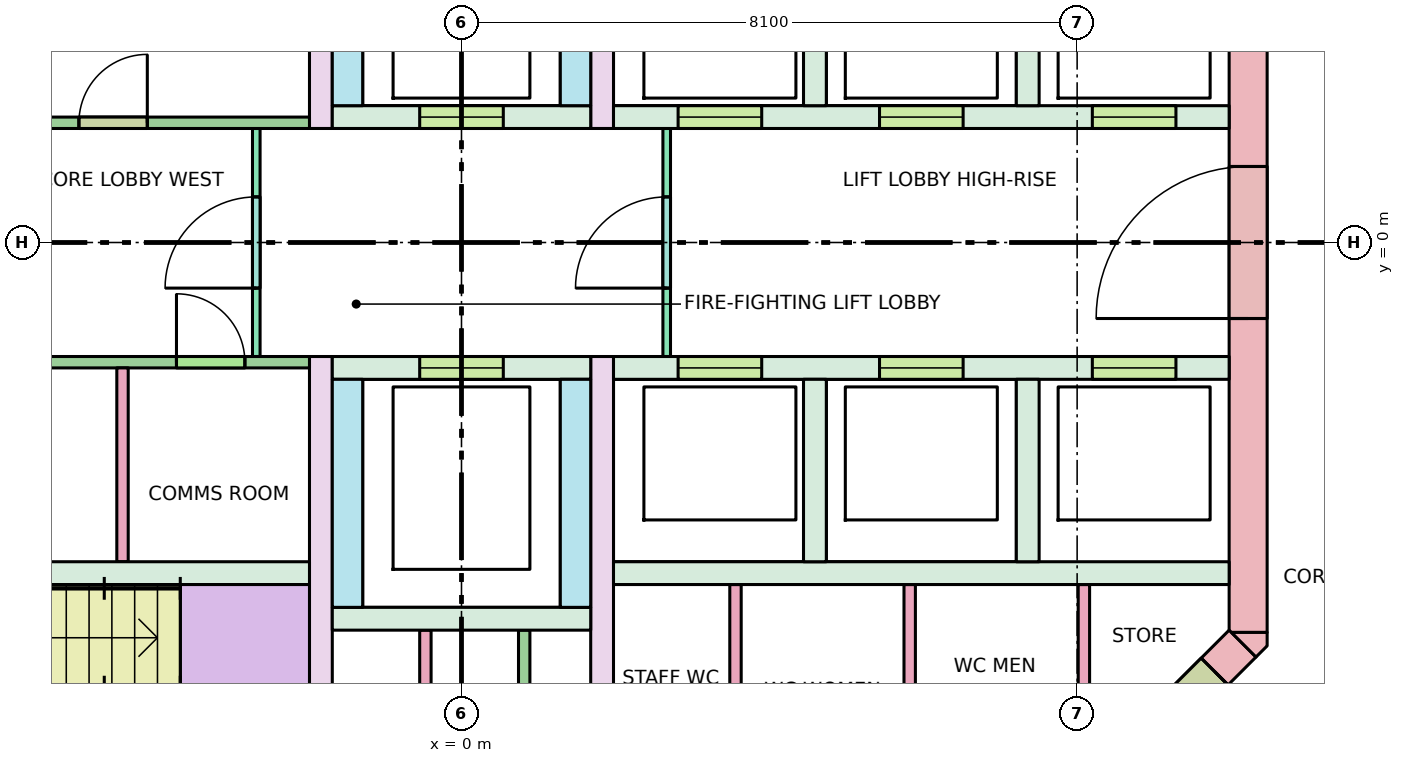
"""IFC4 building model, lengths in metres.
Left out: names, types, materials, properties, quantities, classifications, styles, units other than length and angle.
Written with IfcOpenShell. Run it as: python <this file> out.ifc"""

import sys

from ifc_helpers import new_model, si_unit, direction, frame, frame_2d, origin, place, context, subcontext, project, spatial, polyline, rectangle, outline, extrude, element, fill, save


model = new_model("IFC4")
c1 = context("Model", 3, precision=1e-05, world=origin(), true_north=direction((0.0, 1.0)))
c2 = subcontext(c1, "Body", "Model", "MODEL_VIEW")
j1 = project(units=[si_unit("LENGTHUNIT", "METRE"), si_unit("PLANEANGLEUNIT", "RADIAN")], contexts=[c1])
p1 = place(None, origin())
s1 = spatial("IfcSite", under=j1, at=p1, CompositionType="ELEMENT")
p2 = place(p1, origin())
s2 = spatial("IfcBuilding", under=s1, at=p2, CompositionType="ELEMENT")
p3 = place(p2, frame((0.0, 0.0, 264.9)))
s3 = spatial("IfcBuildingStorey", under=s2, at=p3, CompositionType="ELEMENT", Elevation=264.9)
p4 = place(p3, frame((10.35, -5.13, -0.28), z_axis=(0.0, 0.0, 1.0), x_axis=(0.0, 1.0, 0.0)))
e1 = element("IfcWall", 1, at=p4, inside=s3, PredefinedType="SHEAR", context=c2, shape_type="SweptSolid", body=[
    extrude(rectangle(XDim=10.26, YDim=0.5, at=frame_2d((5.13, 0.0))), origin(), (0.0, 0.0, 1.0), 3.7),
])
p5 = place(p4, frame((4.13, 0.0, 0.28)))
e2 = element("IfcOpeningElement", 2, at=p5, cuts=e1, PredefinedType="OPENING", context=c2, shape_type="SweptSolid", body=[
    extrude(rectangle(XDim=2.0, YDim=2.1, at=frame_2d((1.0, 1.05))), frame((0.0, 0.26, 0.0), z_axis=(0.0, -1.0, 0.0), x_axis=(1.0, 0.0, 0.0)), (0.0, 0.0, 1.0), 0.52),
])
p6 = place(p3, frame((10.277, -5.277, -0.28), z_axis=(0.0, 0.0, 1.0), x_axis=(-0.707106781187, -0.707106781187, 0.0)))
e3 = element("IfcWall", 3, at=p6, inside=s3, PredefinedType="SHEAR", context=c2, shape_type="SweptSolid", body=[
    extrude(rectangle(XDim=4.243, YDim=0.5, at=frame_2d((2.121, 0.0))), origin(), (0.0, 0.0, 1.0), 3.7),
])
p7 = place(p6, frame((2.823, 0.0, 0.28)))
e4 = element("IfcOpeningElement", 4, at=p7, cuts=e3, PredefinedType="OPENING", context=c2, shape_type="SweptSolid", body=[
    extrude(rectangle(XDim=0.9, YDim=2.1, at=frame_2d((0.45, 1.05))), frame((0.0, 0.26, 0.0), z_axis=(0.0, -1.0, 0.0), x_axis=(1.0, 0.0, 0.0)), (0.0, 0.0, 1.0), 0.52),
])
p8 = place(p6, frame((0.52, 0.0, 0.28)))
e5 = element("IfcOpeningElement", 5, at=p8, cuts=e3, PredefinedType="OPENING", context=c2, shape_type="SweptSolid", body=[
    extrude(rectangle(XDim=0.9, YDim=2.1, at=frame_2d((0.45, 1.05))), frame((0.0, 0.26, 0.0), z_axis=(0.0, -1.0, 0.0), x_axis=(1.0, 0.0, 0.0)), (0.0, 0.0, 1.0), 0.52),
])
p9 = place(p3, frame((0.0, 0.0, -0.28)))
e6 = element("IfcWall", 6, at=p9, inside=s3, PredefinedType="SHEAR", context=c2, shape_type="SweptSolid", body=[
    extrude(outline(polyline([(10.6, -5.307), (10.454, -5.454), (10.13, -5.13), (10.6, -5.13), (10.6, -5.307)])), origin(), (0.0, 0.0, 1.0), 3.7),
])
for number, where, z_axis, x_axis in (
    (7, (-10.1, -4.35, 0.0), (0.0, 0.0, 1.0), (1.0, 0.0, 0.0)),
    (8, (2.0, -4.35, 0.0), (0.0, 0.0, 1.0), (1.0, 0.0, 0.0)),
):
    element("IfcWall", number, at=place(p3, frame(where, z_axis=z_axis, x_axis=x_axis)), inside=s3, PredefinedType="SOLIDWALL", context=c2, shape_type="SweptSolid", body=[
        extrude(rectangle(XDim=8.1, YDim=0.3, at=frame_2d((4.05, 0.0))), origin(), (0.0, 0.0, 1.0), 3.42),
    ])
p10 = place(p3, frame((2.0, 1.65, 0.0), z_axis=(0.0, 0.0, 1.0), x_axis=(1.0, 0.0, 0.0)))
e9 = element("IfcWall", 9, at=p10, inside=s3, PredefinedType="SOLIDWALL", context=c2, shape_type="SweptSolid", body=[
    extrude(rectangle(XDim=8.1, YDim=0.3, at=frame_2d((4.05, 0.0))), origin(), (0.0, 0.0, 1.0), 3.42),
])
p11 = place(p10, frame((0.85, 0.0, 0.0)))
e10 = element("IfcOpeningElement", 10, at=p11, cuts=e9, PredefinedType="OPENING", context=c2, shape_type="SweptSolid", body=[
    extrude(rectangle(XDim=1.1, YDim=2.1, at=frame_2d((0.55, 1.05))), frame((0.0, 0.16, 0.0), z_axis=(0.0, -1.0, 0.0), x_axis=(1.0, 0.0, 0.0)), (0.0, 0.0, 1.0), 0.32),
])
p12 = place(p10, frame((3.5, 0.0, 0.0)))
e11 = element("IfcOpeningElement", 11, at=p12, cuts=e9, PredefinedType="OPENING", context=c2, shape_type="SweptSolid", body=[
    extrude(rectangle(XDim=1.1, YDim=2.1, at=frame_2d((0.55, 1.05))), frame((0.0, 0.16, 0.0), z_axis=(0.0, -1.0, 0.0), x_axis=(1.0, 0.0, 0.0)), (0.0, 0.0, 1.0), 0.32),
])
p13 = place(p10, frame((6.3, 0.0, 0.0)))
e12 = element("IfcOpeningElement", 12, at=p13, cuts=e9, PredefinedType="OPENING", context=c2, shape_type="SweptSolid", body=[
    extrude(rectangle(XDim=1.1, YDim=2.1, at=frame_2d((0.55, 1.05))), frame((0.0, 0.16, 0.0), z_axis=(0.0, -1.0, 0.0), x_axis=(1.0, 0.0, 0.0)), (0.0, 0.0, 1.0), 0.32),
])
p14 = place(p3, frame((2.0, -1.65, 0.0), z_axis=(0.0, 0.0, 1.0), x_axis=(1.0, 0.0, 0.0)))
e13 = element("IfcWall", 13, at=p14, inside=s3, PredefinedType="SOLIDWALL", context=c2, shape_type="SweptSolid", body=[
    extrude(rectangle(XDim=8.1, YDim=0.3, at=frame_2d((4.05, 0.0))), origin(), (0.0, 0.0, 1.0), 3.42),
])
p15 = place(p14, frame((0.85, 0.0, 0.0)))
e14 = element("IfcOpeningElement", 14, at=p15, cuts=e13, PredefinedType="OPENING", context=c2, shape_type="SweptSolid", body=[
    extrude(rectangle(XDim=1.1, YDim=2.1, at=frame_2d((0.55, 1.05))), frame((0.0, 0.16, 0.0), z_axis=(0.0, -1.0, 0.0), x_axis=(1.0, 0.0, 0.0)), (0.0, 0.0, 1.0), 0.32),
])
p16 = place(p14, frame((3.5, 0.0, 0.0)))
e15 = element("IfcOpeningElement", 15, at=p16, cuts=e13, PredefinedType="OPENING", context=c2, shape_type="SweptSolid", body=[
    extrude(rectangle(XDim=1.1, YDim=2.1, at=frame_2d((0.55, 1.05))), frame((0.0, 0.16, 0.0), z_axis=(0.0, -1.0, 0.0), x_axis=(1.0, 0.0, 0.0)), (0.0, 0.0, 1.0), 0.32),
])
p17 = place(p14, frame((6.3, 0.0, 0.0)))
e16 = element("IfcOpeningElement", 16, at=p17, cuts=e13, PredefinedType="OPENING", context=c2, shape_type="SweptSolid", body=[
    extrude(rectangle(XDim=1.1, YDim=2.1, at=frame_2d((0.55, 1.05))), frame((0.0, 0.16, 0.0), z_axis=(0.0, -1.0, 0.0), x_axis=(1.0, 0.0, 0.0)), (0.0, 0.0, 1.0), 0.32),
])
for number, where, z_axis, x_axis in (
    (17, (4.65, 1.8, 0.0), (0.0, 0.0, 1.0), (0.0, 1.0, 0.0)),
    (18, (4.65, -4.2, 0.0), (0.0, 0.0, 1.0), (0.0, 1.0, 0.0)),
    (19, (7.45, 1.8, 0.0), (0.0, 0.0, 1.0), (0.0, 1.0, 0.0)),
    (20, (7.45, -4.2, 0.0), (0.0, 0.0, 1.0), (0.0, 1.0, 0.0)),
):
    element("IfcWall", number, at=place(p3, frame(where, z_axis=z_axis, x_axis=x_axis)), inside=s3, PredefinedType="SOLIDWALL", context=c2, shape_type="SweptSolid", body=[
        extrude(rectangle(XDim=2.4, YDim=0.3, at=frame_2d((1.2, 0.0))), origin(), (0.0, 0.0, 1.0), 3.42),
    ])
for number, where, z_axis, x_axis in (
    (21, (-1.85, 1.5, 0.0), (0.0, 0.0, 1.0), (0.0, 1.0, 0.0)),
    (22, (-1.85, -8.1, 0.0), (0.0, 0.0, 1.0), (0.0, 1.0, 0.0)),
    (23, (1.85, 1.5, 0.0), (0.0, 0.0, 1.0), (0.0, 1.0, 0.0)),
    (24, (1.85, -8.1, 0.0), (0.0, 0.0, 1.0), (0.0, 1.0, 0.0)),
):
    element("IfcWall", number, at=place(p3, frame(where, z_axis=z_axis, x_axis=x_axis)), inside=s3, PredefinedType="SHEAR", context=c2, shape_type="SweptSolid", body=[
        extrude(rectangle(XDim=6.6, YDim=0.3, at=frame_2d((3.3, 0.0))), origin(), (0.0, 0.0, 1.0), 3.42),
    ])
p18 = place(p3, frame((-1.7, 1.65, 0.0), z_axis=(0.0, 0.0, 1.0), x_axis=(1.0, 0.0, 0.0)))
e25 = element("IfcWall", 25, at=p18, inside=s3, PredefinedType="SOLIDWALL", context=c2, shape_type="SweptSolid", body=[
    extrude(rectangle(XDim=3.4, YDim=0.3, at=frame_2d((1.7, 0.0))), origin(), (0.0, 0.0, 1.0), 3.42),
])
p19 = place(p18, frame((1.15, 0.0, 0.0)))
e26 = element("IfcOpeningElement", 26, at=p19, cuts=e25, PredefinedType="OPENING", context=c2, shape_type="SweptSolid", body=[
    extrude(rectangle(XDim=1.1, YDim=2.1, at=frame_2d((0.55, 1.05))), frame((0.0, 0.16, 0.0), z_axis=(0.0, -1.0, 0.0), x_axis=(1.0, 0.0, 0.0)), (0.0, 0.0, 1.0), 0.32),
])
p20 = place(p3, frame((-1.7, -1.65, 0.0), z_axis=(0.0, 0.0, 1.0), x_axis=(1.0, 0.0, 0.0)))
e27 = element("IfcWall", 27, at=p20, inside=s3, PredefinedType="SOLIDWALL", context=c2, shape_type="SweptSolid", body=[
    extrude(rectangle(XDim=3.4, YDim=0.3, at=frame_2d((1.7, 0.0))), origin(), (0.0, 0.0, 1.0), 3.42),
])
p21 = place(p20, frame((1.15, 0.0, 0.0)))
e28 = element("IfcOpeningElement", 28, at=p21, cuts=e27, PredefinedType="OPENING", context=c2, shape_type="SweptSolid", body=[
    extrude(rectangle(XDim=1.1, YDim=2.1, at=frame_2d((0.55, 1.05))), frame((0.0, 0.16, 0.0), z_axis=(0.0, -1.0, 0.0), x_axis=(1.0, 0.0, 0.0)), (0.0, 0.0, 1.0), 0.32),
])
for number, where, z_axis, x_axis in (
    (29, (-1.5, 1.8, 0.0), (0.0, 0.0, 1.0), (0.0, 1.0, 0.0)),
    (30, (-1.5, -4.8, 0.0), (0.0, 0.0, 1.0), (0.0, 1.0, 0.0)),
    (31, (1.5, 1.8, 0.0), (0.0, 0.0, 1.0), (0.0, 1.0, 0.0)),
    (32, (1.5, -4.8, 0.0), (0.0, 0.0, 1.0), (0.0, 1.0, 0.0)),
):
    element("IfcWall", number, at=place(p3, frame(where, z_axis=z_axis, x_axis=x_axis)), inside=s3, PredefinedType="SOLIDWALL", context=c2, shape_type="SweptSolid", body=[
        extrude(rectangle(XDim=3.0, YDim=0.4, at=frame_2d((1.5, 0.0))), origin(), (0.0, 0.0, 1.0), 3.42),
    ])
p22 = place(p3, frame((-1.7, -4.95, 0.0), z_axis=(0.0, 0.0, 1.0), x_axis=(1.0, 0.0, 0.0)))
e33 = element("IfcWall", 33, at=p22, inside=s3, PredefinedType="SOLIDWALL", context=c2, shape_type="SweptSolid", body=[
    extrude(rectangle(XDim=3.4, YDim=0.3, at=frame_2d((1.7, 0.0))), origin(), (0.0, 0.0, 1.0), 3.42),
])
p23 = place(p3, frame((-2.7, -1.5, 0.0), z_axis=(0.0, 0.0, 1.0), x_axis=(0.0, 1.0, 0.0)))
e34 = element("IfcWall", 34, at=p23, inside=s3, PredefinedType="PARTITIONING", context=c2, shape_type="SweptSolid", body=[
    extrude(rectangle(XDim=3.0, YDim=0.1, at=frame_2d((1.5, 0.0))), origin(), (0.0, 0.0, 1.0), 3.42),
])
p24 = place(p23, frame((0.9, 0.0, 0.0)))
e35 = element("IfcOpeningElement", 35, at=p24, cuts=e34, PredefinedType="OPENING", context=c2, shape_type="SweptSolid", body=[
    extrude(rectangle(XDim=1.2, YDim=2.1, at=frame_2d((0.6, 1.05))), frame((0.0, 0.06, 0.0), z_axis=(0.0, -1.0, 0.0), x_axis=(1.0, 0.0, 0.0)), (0.0, 0.0, 1.0), 0.12),
])
p25 = place(p3, frame((2.7, -1.5, 0.0), z_axis=(0.0, 0.0, 1.0), x_axis=(0.0, 1.0, 0.0)))
e36 = element("IfcWall", 36, at=p25, inside=s3, PredefinedType="PARTITIONING", context=c2, shape_type="SweptSolid", body=[
    extrude(rectangle(XDim=3.0, YDim=0.1, at=frame_2d((1.5, 0.0))), origin(), (0.0, 0.0, 1.0), 3.42),
])
p26 = place(p25, frame((0.9, 0.0, 0.0)))
e37 = element("IfcOpeningElement", 37, at=p26, cuts=e36, PredefinedType="OPENING", context=c2, shape_type="SweptSolid", body=[
    extrude(rectangle(XDim=1.2, YDim=2.1, at=frame_2d((0.6, 1.05))), frame((0.0, 0.06, 0.0), z_axis=(0.0, -1.0, 0.0), x_axis=(1.0, 0.0, 0.0)), (0.0, 0.0, 1.0), 0.12),
])
for number, where, z_axis, x_axis in (
    (38, (0.825, -8.1, 0.0), (0.0, 0.0, 1.0), (0.0, 1.0, 0.0)),
    (39, (-0.475, -8.1, 0.0), (0.0, 0.0, 1.0), (0.0, 1.0, 0.0)),
):
    element("IfcWall", number, at=place(p3, frame(where, z_axis=z_axis, x_axis=x_axis)), inside=s3, PredefinedType="PARTITIONING", context=c2, shape_type="SweptSolid", body=[
        extrude(rectangle(XDim=3.0, YDim=0.15, at=frame_2d((1.5, 0.0))), origin(), (0.0, 0.0, 1.0), 3.42),
    ])
for number, where, z_axis, x_axis in (
    (40, (3.605, -8.1, 0.0), (0.0, 0.0, 1.0), (0.0, 1.0, 0.0)),
    (41, (5.897, -8.1, 0.0), (0.0, 0.0, 1.0), (0.0, 1.0, 0.0)),
):
    element("IfcWall", number, at=place(p3, frame(where, z_axis=z_axis, x_axis=x_axis)), inside=s3, PredefinedType="PARTITIONING", context=c2, shape_type="SweptSolid", body=[
        extrude(rectangle(XDim=3.6, YDim=0.15, at=frame_2d((1.8, 0.0))), origin(), (0.0, 0.0, 1.0), 3.42),
    ])
p27 = place(p3, frame((8.189, -6.936, 0.0), z_axis=(0.0, 0.0, 1.0), x_axis=(0.0, 1.0, 0.0)))
e42 = element("IfcWall", 42, at=p27, inside=s3, PredefinedType="PARTITIONING", context=c2, shape_type="SweptSolid", body=[
    extrude(rectangle(XDim=2.436, YDim=0.15, at=frame_2d((1.218, 0.0))), origin(), (0.0, 0.0, 1.0), 3.42),
])
p28 = place(p3, frame((-4.46, -4.2, 0.0), z_axis=(0.0, 0.0, 1.0), x_axis=(0.0, 1.0, 0.0)))
e43 = element("IfcWall", 43, at=p28, inside=s3, PredefinedType="PARTITIONING", context=c2, shape_type="SweptSolid", body=[
    extrude(rectangle(XDim=2.55, YDim=0.15, at=frame_2d((1.275, 0.0))), origin(), (0.0, 0.0, 1.0), 3.42),
])
p29 = place(p3, frame((-10.1, 1.575, 0.0), z_axis=(0.0, 0.0, 1.0), x_axis=(1.0, 0.0, 0.0)))
e44 = element("IfcWall", 44, at=p29, inside=s3, PredefinedType="PARTITIONING", context=c2, shape_type="SweptSolid", body=[
    extrude(rectangle(XDim=8.1, YDim=0.15, at=frame_2d((4.05, 0.0))), origin(), (0.0, 0.0, 1.0), 3.42),
])
p30 = place(p29, frame((0.941, 0.0, 0.0)))
e45 = element("IfcOpeningElement", 45, at=p30, cuts=e44, PredefinedType="OPENING", context=c2, shape_type="SweptSolid", body=[
    extrude(rectangle(XDim=0.9, YDim=2.1, at=frame_2d((0.45, 1.05))), frame((0.0, 0.085, 0.0), z_axis=(0.0, -1.0, 0.0), x_axis=(1.0, 0.0, 0.0)), (0.0, 0.0, 1.0), 0.17),
])
p31 = place(p29, frame((5.066, 0.0, 0.0)))
e46 = element("IfcOpeningElement", 46, at=p31, cuts=e44, PredefinedType="OPENING", context=c2, shape_type="SweptSolid", body=[
    extrude(rectangle(XDim=0.9, YDim=2.1, at=frame_2d((0.45, 1.05))), frame((0.0, 0.085, 0.0), z_axis=(0.0, -1.0, 0.0), x_axis=(1.0, 0.0, 0.0)), (0.0, 0.0, 1.0), 0.17),
])
p32 = place(p3, frame((-10.1, -1.575, 0.0), z_axis=(0.0, 0.0, 1.0), x_axis=(1.0, 0.0, 0.0)))
e47 = element("IfcWall", 47, at=p32, inside=s3, PredefinedType="PARTITIONING", context=c2, shape_type="SweptSolid", body=[
    extrude(rectangle(XDim=8.1, YDim=0.15, at=frame_2d((4.05, 0.0))), origin(), (0.0, 0.0, 1.0), 3.42),
])
p33 = place(p32, frame((2.333, 0.0, 0.0)))
e48 = element("IfcOpeningElement", 48, at=p33, cuts=e47, PredefinedType="OPENING", context=c2, shape_type="SweptSolid", body=[
    extrude(rectangle(XDim=0.9, YDim=2.1, at=frame_2d((0.45, 1.05))), frame((0.0, 0.085, 0.0), z_axis=(0.0, -1.0, 0.0), x_axis=(1.0, 0.0, 0.0)), (0.0, 0.0, 1.0), 0.17),
])
p34 = place(p32, frame((6.35, 0.0, 0.0)))
e49 = element("IfcOpeningElement", 49, at=p34, cuts=e47, PredefinedType="OPENING", context=c2, shape_type="SweptSolid", body=[
    extrude(rectangle(XDim=0.9, YDim=2.1, at=frame_2d((0.45, 1.05))), frame((0.0, 0.085, 0.0), z_axis=(0.0, -1.0, 0.0), x_axis=(1.0, 0.0, 0.0)), (0.0, 0.0, 1.0), 0.17),
])
p35 = place(p11, origin())
e50 = element("IfcDoor", 50, at=p35, inside=s3, OperationType="DOUBLE_DOOR_SLIDING", PredefinedType="DOOR", context=c2, shape_type="SweptSolid", body=[
    extrude(rectangle(XDim=1.1, YDim=2.1, at=frame_2d((0.55, 1.05))), frame((0.0, 0.025, 0.0), z_axis=(0.0, -1.0, 0.0), x_axis=(1.0, 0.0, 0.0)), (0.0, 0.0, 1.0), 0.05),
])
fill(e10, e50)
p36 = place(p12, origin())
e51 = element("IfcDoor", 51, at=p36, inside=s3, OperationType="DOUBLE_DOOR_SLIDING", PredefinedType="DOOR", context=c2, shape_type="SweptSolid", body=[
    extrude(rectangle(XDim=1.1, YDim=2.1, at=frame_2d((0.55, 1.05))), frame((0.0, 0.025, 0.0), z_axis=(0.0, -1.0, 0.0), x_axis=(1.0, 0.0, 0.0)), (0.0, 0.0, 1.0), 0.05),
])
fill(e11, e51)
p37 = place(p13, origin())
e52 = element("IfcDoor", 52, at=p37, inside=s3, OperationType="DOUBLE_DOOR_SLIDING", PredefinedType="DOOR", context=c2, shape_type="SweptSolid", body=[
    extrude(rectangle(XDim=1.1, YDim=2.1, at=frame_2d((0.55, 1.05))), frame((0.0, 0.025, 0.0), z_axis=(0.0, -1.0, 0.0), x_axis=(1.0, 0.0, 0.0)), (0.0, 0.0, 1.0), 0.05),
])
fill(e12, e52)
p38 = place(p15, origin())
e53 = element("IfcDoor", 53, at=p38, inside=s3, OperationType="DOUBLE_DOOR_SLIDING", PredefinedType="DOOR", context=c2, shape_type="SweptSolid", body=[
    extrude(rectangle(XDim=1.1, YDim=2.1, at=frame_2d((0.55, 1.05))), frame((0.0, 0.025, 0.0), z_axis=(0.0, -1.0, 0.0), x_axis=(1.0, 0.0, 0.0)), (0.0, 0.0, 1.0), 0.05),
])
fill(e14, e53)
p39 = place(p16, origin())
e54 = element("IfcDoor", 54, at=p39, inside=s3, OperationType="DOUBLE_DOOR_SLIDING", PredefinedType="DOOR", context=c2, shape_type="SweptSolid", body=[
    extrude(rectangle(XDim=1.1, YDim=2.1, at=frame_2d((0.55, 1.05))), frame((0.0, 0.025, 0.0), z_axis=(0.0, -1.0, 0.0), x_axis=(1.0, 0.0, 0.0)), (0.0, 0.0, 1.0), 0.05),
])
fill(e15, e54)
p40 = place(p17, origin())
e55 = element("IfcDoor", 55, at=p40, inside=s3, OperationType="DOUBLE_DOOR_SLIDING", PredefinedType="DOOR", context=c2, shape_type="SweptSolid", body=[
    extrude(rectangle(XDim=1.1, YDim=2.1, at=frame_2d((0.55, 1.05))), frame((0.0, 0.025, 0.0), z_axis=(0.0, -1.0, 0.0), x_axis=(1.0, 0.0, 0.0)), (0.0, 0.0, 1.0), 0.05),
])
fill(e16, e55)
p41 = place(p19, origin())
e56 = element("IfcDoor", 56, at=p41, inside=s3, OperationType="DOUBLE_DOOR_SLIDING", PredefinedType="DOOR", context=c2, shape_type="SweptSolid", body=[
    extrude(rectangle(XDim=1.1, YDim=2.1, at=frame_2d((0.55, 1.05))), frame((0.0, 0.025, 0.0), z_axis=(0.0, -1.0, 0.0), x_axis=(1.0, 0.0, 0.0)), (0.0, 0.0, 1.0), 0.05),
])
fill(e26, e56)
p42 = place(p21, origin())
e57 = element("IfcDoor", 57, at=p42, inside=s3, OperationType="DOUBLE_DOOR_SLIDING", PredefinedType="DOOR", context=c2, shape_type="SweptSolid", body=[
    extrude(rectangle(XDim=1.1, YDim=2.1, at=frame_2d((0.55, 1.05))), frame((0.0, 0.025, 0.0), z_axis=(0.0, -1.0, 0.0), x_axis=(1.0, 0.0, 0.0)), (0.0, 0.0, 1.0), 0.05),
])
fill(e28, e57)
p43 = place(p5, origin())
e58 = element("IfcDoor", 58, at=p43, inside=s3, OperationType="DOUBLE_DOOR_SINGLE_SWING", PredefinedType="DOOR", context=c2, shape_type="SweptSolid", body=[
    extrude(rectangle(XDim=2.0, YDim=2.1, at=frame_2d((1.0, 1.05))), frame((0.0, 0.025, 0.0), z_axis=(0.0, -1.0, 0.0), x_axis=(1.0, 0.0, 0.0)), (0.0, 0.0, 1.0), 0.05),
])
fill(e2, e58)
p44 = place(p24, origin())
e59 = element("IfcDoor", 59, at=p44, inside=s3, OperationType="SINGLE_SWING_LEFT", PredefinedType="DOOR", context=c2, shape_type="SweptSolid", body=[
    extrude(rectangle(XDim=1.2, YDim=2.1, at=frame_2d((0.6, 1.05))), frame((0.0, 0.025, 0.0), z_axis=(0.0, -1.0, 0.0), x_axis=(1.0, 0.0, 0.0)), (0.0, 0.0, 1.0), 0.05),
])
fill(e35, e59)
p45 = place(p26, origin())
e60 = element("IfcDoor", 60, at=p45, inside=s3, OperationType="SINGLE_SWING_LEFT", PredefinedType="DOOR", context=c2, shape_type="SweptSolid", body=[
    extrude(rectangle(XDim=1.2, YDim=2.1, at=frame_2d((0.6, 1.05))), frame((0.0, 0.025, 0.0), z_axis=(0.0, -1.0, 0.0), x_axis=(1.0, 0.0, 0.0)), (0.0, 0.0, 1.0), 0.05),
])
fill(e37, e60)
p46 = place(p8, origin())
e61 = element("IfcDoor", 61, at=p46, inside=s3, OperationType="SINGLE_SWING_LEFT", PredefinedType="DOOR", context=c2, shape_type="SweptSolid", body=[
    extrude(rectangle(XDim=0.9, YDim=2.1, at=frame_2d((0.45, 1.05))), frame((0.0, 0.025, 0.0), z_axis=(0.0, -1.0, 0.0), x_axis=(1.0, 0.0, 0.0)), (0.0, 0.0, 1.0), 0.05),
])
fill(e5, e61)
p47 = place(p31, origin())
e62 = element("IfcDoor", 62, at=p47, inside=s3, OperationType="SINGLE_SWING_RIGHT", PredefinedType="DOOR", context=c2, shape_type="SweptSolid", body=[
    extrude(rectangle(XDim=0.9, YDim=2.1, at=frame_2d((0.45, 1.05))), frame((0.0, 0.025, 0.0), z_axis=(0.0, -1.0, 0.0), x_axis=(1.0, 0.0, 0.0)), (0.0, 0.0, 1.0), 0.05),
])
fill(e46, e62)
p48 = place(p34, origin())
e63 = element("IfcDoor", 63, at=p48, inside=s3, OperationType="SINGLE_SWING_LEFT", PredefinedType="DOOR", context=c2, shape_type="SweptSolid", body=[
    extrude(rectangle(XDim=0.9, YDim=2.1, at=frame_2d((0.45, 1.05))), frame((0.0, 0.025, 0.0), z_axis=(0.0, -1.0, 0.0), x_axis=(1.0, 0.0, 0.0)), (0.0, 0.0, 1.0), 0.05),
])
fill(e49, e63)
save(model, sys.argv[1])
